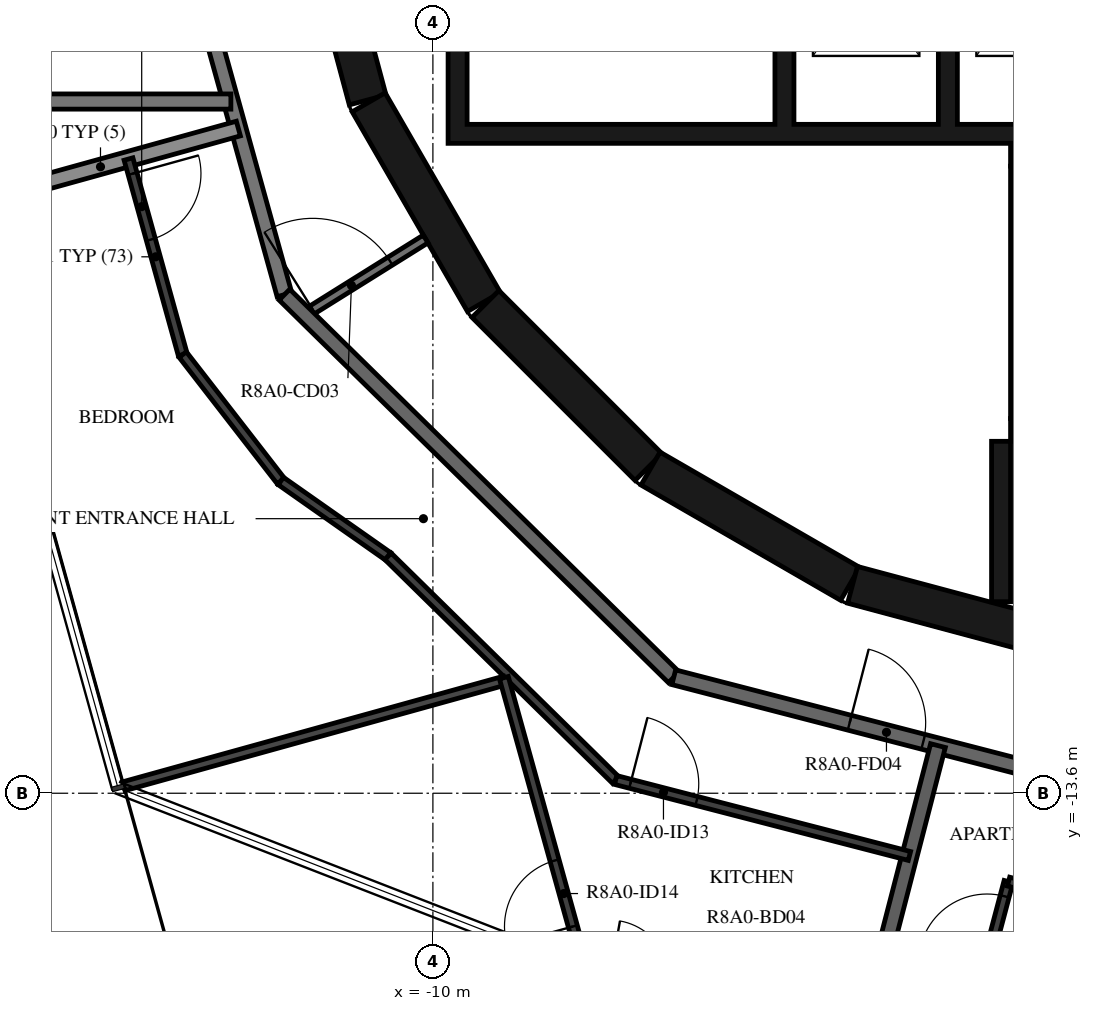
"""IFC4 building model, lengths in metres.
Left out: names, types, materials, properties, quantities, classifications, styles, units other than length and angle.
Written with IfcOpenShell. Run it as: python <this file> out.ifc"""

import sys

from ifc_helpers import new_model, si_unit, direction, frame, frame_2d, origin, place, context, subcontext, project, spatial, polyline, rectangle, outline, extrude, element, fill, save


model = new_model("IFC4")
c1 = context("Model", 3, precision=1e-05, world=origin(), true_north=direction((0.0, 1.0)))
c2 = subcontext(c1, "Body", "Model", "MODEL_VIEW")
j1 = project(units=[si_unit("LENGTHUNIT", "METRE"), si_unit("PLANEANGLEUNIT", "RADIAN")], contexts=[c1])
p1 = place(None, origin())
s1 = spatial("IfcSite", under=j1, at=p1, CompositionType="ELEMENT")
p2 = place(p1, origin())
s2 = spatial("IfcBuilding", under=s1, at=p2, CompositionType="ELEMENT")
p3 = place(p2, frame((0.0, 0.0, 305.2)))
s3 = spatial("IfcBuildingStorey", under=s2, at=p3, CompositionType="ELEMENT", Elevation=305.2)
p4 = place(p3, frame((-11.643, -1.55, 0.0), z_axis=(0.0, 0.0, 1.0), x_axis=(0.258734743916, -0.965948410781, 0.0)))
e1 = element("IfcWall", 1, at=p4, inside=s3, PredefinedType="SHEAR", context=c2, shape_type="SweptSolid", body=[
    extrude(rectangle(XDim=3.033, YDim=0.5, at=frame_2d((1.516, 0.0))), origin(), (0.0, 0.0, 1.0), 3.12),
])
p5 = place(p4, frame((1.066, 0.0, 0.0)))
e2 = element("IfcOpeningElement", 2, at=p5, cuts=e1, PredefinedType="OPENING", context=c2, shape_type="SweptSolid", body=[
    extrude(rectangle(XDim=0.9, YDim=2.1, at=frame_2d((0.45, 1.05))), frame((0.0, 0.26, 0.0), z_axis=(0.0, -1.0, 0.0), x_axis=(1.0, 0.0, 0.0)), (0.0, 0.0, 1.0), 0.52),
])
p6 = place(p3, frame((-10.845, -4.51, 0.0), z_axis=(0.0, 0.0, 1.0), x_axis=(0.500087131594, -0.865975092491, 0.0)))
e3 = element("IfcWall", 3, at=p6, inside=s3, PredefinedType="SHEAR", context=c2, shape_type="SweptSolid", body=[
    extrude(rectangle(XDim=3.033, YDim=0.5, at=frame_2d((1.516, 0.0))), origin(), (0.0, 0.0, 1.0), 3.12),
])
p7 = place(p3, frame((-9.308, -7.164, 0.0), z_axis=(0.0, 0.0, 1.0), x_axis=(0.707106781187, -0.707106781187, 0.0)))
e4 = element("IfcWall", 4, at=p7, inside=s3, PredefinedType="SHEAR", context=c2, shape_type="SweptSolid", body=[
    extrude(rectangle(XDim=3.032, YDim=0.5, at=frame_2d((1.516, 0.0))), origin(), (0.0, 0.0, 1.0), 3.12),
])
for number, where, z_axis, x_axis in (
    (5, (-7.137, -9.329, 0.0), (0.0, 0.0, 1.0), (0.866, -0.5, 0.0)),
    (6, (-4.479, -10.858, 0.0), (0.0, 0.0, 1.0), (0.966, -0.259, 0.0)),
):
    element("IfcWall", number, at=place(p3, frame(where, z_axis=z_axis, x_axis=x_axis)), inside=s3, PredefinedType="SHEAR", context=c2, shape_type="SweptSolid", body=[
        extrude(rectangle(XDim=3.033, YDim=0.5, at=frame_2d((1.516, 0.0))), origin(), (0.0, 0.0, 1.0), 3.12),
    ])
p8 = place(p3, frame((-2.275, -8.67, 0.0), z_axis=(0.0, 0.0, 1.0), x_axis=(0.0, 1.0, 0.0)))
e7 = element("IfcWall", 7, at=p8, inside=s3, PredefinedType="SHEAR", context=c2, shape_type="SweptSolid", body=[
    extrude(rectangle(XDim=3.32, YDim=0.25, at=frame_2d((1.66, 0.0))), origin(), (0.0, 0.0, 1.0), 3.12),
])
p9 = place(p3, frame((-2.4, -5.2, 0.0), z_axis=(0.0, 0.0, 1.0), x_axis=(1.0, 0.0, 0.0)))
e8 = element("IfcWall", 8, at=p9, inside=s3, PredefinedType="SHEAR", context=c2, shape_type="SweptSolid", body=[
    extrude(rectangle(XDim=7.05, YDim=0.3, at=frame_2d((3.525, 0.0))), origin(), (0.0, 0.0, 1.0), 3.12),
])
p10 = place(p3, frame((-2.4, -8.82, 0.0), z_axis=(0.0, 0.0, 1.0), x_axis=(1.0, 0.0, 0.0)))
e9 = element("IfcWall", 9, at=p10, inside=s3, PredefinedType="SHEAR", context=c2, shape_type="SweptSolid", body=[
    extrude(rectangle(XDim=2.5, YDim=0.3, at=frame_2d((1.25, 0.0))), origin(), (0.0, 0.0, 1.0), 3.12),
])
p11 = place(p10, frame((0.65, 0.0, 0.0)))
e10 = element("IfcOpeningElement", 10, at=p11, cuts=e9, PredefinedType="OPENING", context=c2, shape_type="SweptSolid", body=[
    extrude(rectangle(XDim=1.2, YDim=2.1, at=frame_2d((0.6, 1.05))), frame((0.0, 0.16, 0.0), z_axis=(0.0, -1.0, 0.0), x_axis=(1.0, 0.0, 0.0)), (0.0, 0.0, 1.0), 0.32),
])
p12 = place(p3, frame((-2.525, -8.97, 0.0), z_axis=(0.0, 0.0, 1.0), x_axis=(0.0, -1.0, 0.0)))
e11 = element("IfcWall", 11, at=p12, inside=s3, PredefinedType="SHEAR", context=c2, shape_type="SweptSolid", body=[
    extrude(rectangle(XDim=2.11, YDim=0.25, at=frame_2d((1.055, 0.0))), origin(), (0.0, 0.0, 1.0), 3.12),
])
p13 = place(p3, origin())
e12 = element("IfcWall", 12, at=p13, inside=s3, PredefinedType="SHEAR", context=c2, shape_type="SweptSolid", body=[
    extrude(outline(polyline([(9.8, -5.05), (9.8, -4.8), (9.8, -1.9), (9.55, -1.9), (9.55, -4.8), (7.65, -4.8), (7.65, -1.9), (7.4, -1.9), (7.4, -4.8), (5.5, -4.8), (5.5, -1.9), (5.25, -1.9), (5.25, -4.8), (3.35, -4.8), (3.35, -1.9), (3.1, -1.9), (3.1, -4.8), (1.2, -4.8), (1.2, -1.9), (0.95, -1.9), (0.95, -4.8), (-0.95, -4.8), (-0.95, -1.9), (-1.2, -1.9), (-1.2, -4.8), (-3.1, -4.8), (-3.1, -1.9), (-3.35, -1.9), (-3.35, -4.8), (-5.25, -4.8), (-5.25, -1.9), (-5.5, -1.9), (-5.5, -4.8), (-9.55, -4.8), (-9.55, -1.9), (-9.8, -1.9), (-9.8, -4.8), (-9.8, -5.05), (9.8, -5.05)])), origin(), (0.0, 0.0, 1.0), 3.12),
])
p14 = place(p3, frame((-11.687, -7.303, 0.0), z_axis=(0.0, 0.0, 1.0), x_axis=(0.848064094072, 0.529893661357, 0.0)))
e13 = element("IfcWall", 13, at=p14, inside=s3, PredefinedType="PARTITIONING", context=c2, shape_type="SweptSolid", body=[
    extrude(rectangle(XDim=1.876, YDim=0.12, at=frame_2d((0.938, 0.0))), origin(), (0.0, 0.0, 1.0), 3.12),
])
p15 = place(p14, frame((0.125, 0.0, 0.0)))
e14 = element("IfcOpeningElement", 14, at=p15, cuts=e13, PredefinedType="OPENING", context=c2, shape_type="SweptSolid", body=[
    extrude(rectangle(XDim=1.2, YDim=2.1, at=frame_2d((0.6, 1.05))), frame((0.0, 0.07, 0.0), z_axis=(0.0, -1.0, 0.0), x_axis=(1.0, 0.0, 0.0)), (0.0, 0.0, 1.0), 0.14),
])
p16 = place(p3, frame((-13.872, -0.121, 0.0), z_axis=(0.0, 0.0, 1.0), x_axis=(0.267254575108, -0.963625960674, 0.0)))
e15 = element("IfcWall", 15, at=p16, inside=s3, PredefinedType="STANDARD", context=c2, shape_type="SweptSolid", body=[
    extrude(rectangle(XDim=7.181, YDim=0.2, at=frame_2d((3.591, 0.0))), origin(), (0.0, 0.0, 1.0), 3.12),
])
p17 = place(p3, frame((-11.953, -7.041, 0.0), z_axis=(0.0, 0.0, 1.0), x_axis=(0.713250549143, -0.70090916255, 0.0)))
e16 = element("IfcWall", 16, at=p17, inside=s3, PredefinedType="STANDARD", context=c2, shape_type="SweptSolid", body=[
    extrude(rectangle(XDim=7.181, YDim=0.2, at=frame_2d((3.59, 0.0))), origin(), (0.0, 0.0, 1.0), 3.12),
])
p18 = place(p3, frame((-6.831, -12.074, 0.0), z_axis=(0.0, 0.0, 1.0), x_axis=(0.968144780225, -0.250391063186, 0.0)))
e17 = element("IfcWall", 17, at=p18, inside=s3, PredefinedType="STANDARD", context=c2, shape_type="SweptSolid", body=[
    extrude(rectangle(XDim=7.181, YDim=0.2, at=frame_2d((3.591, 0.0))), origin(), (0.0, 0.0, 1.0), 3.12),
])
p19 = place(p18, frame((2.39, 0.0, 0.0)))
e18 = element("IfcOpeningElement", 18, at=p19, cuts=e17, PredefinedType="OPENING", context=c2, shape_type="SweptSolid", body=[
    extrude(rectangle(XDim=1.0, YDim=2.1, at=frame_2d((0.5, 1.05))), frame((0.0, 0.11, 0.0), z_axis=(0.0, -1.0, 0.0), x_axis=(1.0, 0.0, 0.0)), (0.0, 0.0, 1.0), 0.22),
])
p20 = place(p18, frame((5.69, 0.0, 0.0)))
e19 = element("IfcOpeningElement", 19, at=p20, cuts=e17, PredefinedType="OPENING", context=c2, shape_type="SweptSolid", body=[
    extrude(rectangle(XDim=1.0, YDim=2.1, at=frame_2d((0.5, 1.05))), frame((0.0, 0.11, 0.0), z_axis=(0.0, -1.0, 0.0), x_axis=(1.0, 0.0, 0.0)), (0.0, 0.0, 1.0), 0.22),
])
p21 = place(p3, frame((-16.564, -4.5, 0.0), z_axis=(0.0, 0.0, 1.0), x_axis=(1.0, 0.0, 0.0)))
e20 = element("IfcWall", 20, at=p21, inside=s3, PredefinedType="STANDARD", context=c2, shape_type="SweptSolid", body=[
    extrude(rectangle(XDim=3.907, YDim=0.2, at=frame_2d((1.953, 0.0))), origin(), (0.0, 0.0, 1.0), 3.12),
])
p22 = place(p3, frame((-16.187, -5.862, 0.0), z_axis=(0.0, 0.0, 1.0), x_axis=(0.963631166683, 0.267235803358, 0.0)))
e21 = element("IfcWall", 21, at=p22, inside=s3, PredefinedType="STANDARD", context=c2, shape_type="SweptSolid", body=[
    extrude(rectangle(XDim=3.765, YDim=0.2, at=frame_2d((1.882, 0.0))), origin(), (0.0, 0.0, 1.0), 2.73),
])
p23 = place(p3, frame((-4.214, -16.295, 0.0), z_axis=(0.0, 0.0, 1.0), x_axis=(0.250428810918, 0.968135016752, 0.0)))
e22 = element("IfcWall", 22, at=p23, inside=s3, PredefinedType="STANDARD", context=c2, shape_type="SweptSolid", body=[
    extrude(rectangle(XDim=3.432, YDim=0.2, at=frame_2d((1.716, 0.0))), origin(), (0.0, 0.0, 1.0), 3.12),
])
p24 = place(p3, frame((-14.005, -5.256, 0.0), z_axis=(0.0, 0.0, 1.0), x_axis=(0.267200500487, -0.963640956238, 0.0)))
e23 = element("IfcWall", 23, at=p24, inside=s3, PredefinedType="PARTITIONING", context=c2, shape_type="SweptSolid", body=[
    extrude(rectangle(XDim=2.67, YDim=0.12, at=frame_2d((1.335, 0.0))), origin(), (0.0, 0.0, 1.0), 3.12),
])
p25 = place(p24, frame((0.2, 0.0, 0.0)))
e24 = element("IfcOpeningElement", 24, at=p25, cuts=e23, PredefinedType="OPENING", context=c2, shape_type="SweptSolid", body=[
    extrude(rectangle(XDim=0.9, YDim=2.1, at=frame_2d((0.45, 1.05))), frame((0.0, 0.07, 0.0), z_axis=(0.0, -1.0, 0.0), x_axis=(1.0, 0.0, 0.0)), (0.0, 0.0, 1.0), 0.14),
])
p26 = place(p3, frame((-13.291, -7.829, 0.0), z_axis=(0.0, 0.0, 1.0), x_axis=(0.613017069232, -0.790069663277, 0.0)))
e25 = element("IfcWall", 25, at=p26, inside=s3, PredefinedType="PARTITIONING", context=c2, shape_type="SweptSolid", body=[
    extrude(rectangle(XDim=2.106, YDim=0.12, at=frame_2d((1.053, 0.0))), origin(), (0.0, 0.0, 1.0), 3.12),
])
p27 = place(p3, frame((-12.0, -9.493, 0.0), z_axis=(0.0, 0.0, 1.0), x_axis=(0.818312362022, -0.57477376259, 0.0)))
e26 = element("IfcWall", 26, at=p27, inside=s3, PredefinedType="PARTITIONING", context=c2, shape_type="SweptSolid", body=[
    extrude(rectangle(XDim=1.723, YDim=0.12, at=frame_2d((0.862, 0.0))), origin(), (0.0, 0.0, 1.0), 3.12),
])
p28 = place(p3, frame((-10.59, -10.483, 0.0), z_axis=(0.0, 0.0, 1.0), x_axis=(0.713244109461, -0.70091571556, 0.0)))
e27 = element("IfcWall", 27, at=p28, inside=s3, PredefinedType="PARTITIONING", context=c2, shape_type="SweptSolid", body=[
    extrude(rectangle(XDim=4.198, YDim=0.12, at=frame_2d((2.099, 0.0))), origin(), (0.0, 0.0, 1.0), 3.12),
])
p29 = place(p3, frame((-7.596, -13.426, 0.0), z_axis=(0.0, 0.0, 1.0), x_axis=(0.96815406745, -0.250355151095, 0.0)))
e28 = element("IfcWall", 28, at=p29, inside=s3, PredefinedType="PARTITIONING", context=c2, shape_type="SweptSolid", body=[
    extrude(rectangle(XDim=3.992, YDim=0.12, at=frame_2d((1.996, 0.0))), origin(), (0.0, 0.0, 1.0), 3.12),
])
p30 = place(p29, frame((0.2, 0.0, 0.0)))
e29 = element("IfcOpeningElement", 29, at=p30, cuts=e28, PredefinedType="OPENING", context=c2, shape_type="SweptSolid", body=[
    extrude(rectangle(XDim=0.9, YDim=2.1, at=frame_2d((0.45, 1.05))), frame((0.0, 0.07, 0.0), z_axis=(0.0, -1.0, 0.0), x_axis=(1.0, 0.0, 0.0)), (0.0, 0.0, 1.0), 0.14),
])
p31 = place(p3, frame((-14.066, -13.508, 0.0), z_axis=(0.0, 0.0, 1.0), x_axis=(0.963643585504, 0.267191018032, 0.0)))
e30 = element("IfcWall", 30, at=p31, inside=s3, PredefinedType="PARTITIONING", context=c2, shape_type="SweptSolid", body=[
    extrude(rectangle(XDim=5.2, YDim=0.12, at=frame_2d((2.6, 0.0))), origin(), (0.0, 0.0, 1.0), 2.73),
])
p32 = place(p3, frame((-7.368, -18.202, 0.0), z_axis=(0.0, 0.0, 1.0), x_axis=(-0.26723158658, 0.963632336077, 0.0)))
e31 = element("IfcWall", 31, at=p32, inside=s3, PredefinedType="PARTITIONING", context=c2, shape_type="SweptSolid", body=[
    extrude(rectangle(XDim=6.353, YDim=0.12, at=frame_2d((3.177, 0.0))), origin(), (0.0, 0.0, 1.0), 3.12),
])
p33 = place(p32, frame((2.956, 0.0, 0.0)))
e32 = element("IfcOpeningElement", 32, at=p33, cuts=e31, PredefinedType="OPENING", context=c2, shape_type="SweptSolid", body=[
    extrude(rectangle(XDim=0.9, YDim=2.1, at=frame_2d((0.45, 1.05))), frame((0.0, 0.07, 0.0), z_axis=(0.0, -1.0, 0.0), x_axis=(1.0, 0.0, 0.0)), (0.0, 0.0, 1.0), 0.14),
])
p34 = place(p3, frame((-3.139, -17.448, 0.0), z_axis=(0.0, 0.0, 1.0), x_axis=(0.256551998295, 0.966530430028, 0.0)))
e33 = element("IfcWall", 33, at=p34, inside=s3, PredefinedType="PARTITIONING", context=c2, shape_type="SweptSolid", body=[
    extrude(rectangle(XDim=2.778, YDim=0.12, at=frame_2d((1.389, 0.0))), origin(), (0.0, 0.0, 1.0), 3.12),
])
p35 = place(p34, frame((1.678, 0.0, 0.0)))
e34 = element("IfcOpeningElement", 34, at=p35, cuts=e33, PredefinedType="OPENING", context=c2, shape_type="SweptSolid", body=[
    extrude(rectangle(XDim=0.9, YDim=2.1, at=frame_2d((0.45, 1.05))), frame((0.0, 0.07, 0.0), z_axis=(0.0, -1.0, 0.0), x_axis=(1.0, 0.0, 0.0)), (0.0, 0.0, 1.0), 0.14),
])
p36 = place(p3, frame((-2.427, -14.763, 0.0), z_axis=(0.0, 0.0, 1.0), x_axis=(0.968151154118, -0.250366417036, 0.0)))
e35 = element("IfcWall", 35, at=p36, inside=s3, PredefinedType="PARTITIONING", context=c2, shape_type="SweptSolid", body=[
    extrude(rectangle(XDim=2.646, YDim=0.12, at=frame_2d((1.323, 0.0))), origin(), (0.0, 0.0, 1.0), 3.12),
])
p37 = place(p19, origin())
e36 = element("IfcDoor", 36, at=p37, inside=s3, OperationType="SINGLE_SWING_RIGHT", PredefinedType="DOOR", context=c2, shape_type="SweptSolid", body=[
    extrude(rectangle(XDim=1.0, YDim=2.1, at=frame_2d((0.5, 1.05))), frame((0.0, 0.025, 0.0), z_axis=(0.0, -1.0, 0.0), x_axis=(1.0, 0.0, 0.0)), (0.0, 0.0, 1.0), 0.05),
])
fill(e18, e36)
p38 = place(p25, origin())
e37 = element("IfcDoor", 37, at=p38, inside=s3, OperationType="SINGLE_SWING_RIGHT", PredefinedType="DOOR", context=c2, shape_type="SweptSolid", body=[
    extrude(rectangle(XDim=0.9, YDim=2.1, at=frame_2d((0.45, 1.05))), frame((0.0, 0.025, 0.0), z_axis=(0.0, -1.0, 0.0), x_axis=(1.0, 0.0, 0.0)), (0.0, 0.0, 1.0), 0.05),
])
fill(e24, e37)
p39 = place(p30, origin())
e38 = element("IfcDoor", 38, at=p39, inside=s3, OperationType="SINGLE_SWING_RIGHT", PredefinedType="DOOR", context=c2, shape_type="SweptSolid", body=[
    extrude(rectangle(XDim=0.9, YDim=2.1, at=frame_2d((0.45, 1.05))), frame((0.0, 0.025, 0.0), z_axis=(0.0, -1.0, 0.0), x_axis=(1.0, 0.0, 0.0)), (0.0, 0.0, 1.0), 0.05),
])
fill(e29, e38)
p40 = place(p33, origin())
e39 = element("IfcDoor", 39, at=p40, inside=s3, OperationType="SINGLE_SWING_RIGHT", PredefinedType="DOOR", context=c2, shape_type="SweptSolid", body=[
    extrude(rectangle(XDim=0.9, YDim=2.1, at=frame_2d((0.45, 1.05))), frame((0.0, 0.025, 0.0), z_axis=(0.0, -1.0, 0.0), x_axis=(1.0, 0.0, 0.0)), (0.0, 0.0, 1.0), 0.05),
])
fill(e32, e39)
p41 = place(p35, origin())
e40 = element("IfcDoor", 40, at=p41, inside=s3, OperationType="SINGLE_SWING_LEFT", PredefinedType="DOOR", context=c2, shape_type="SweptSolid", body=[
    extrude(rectangle(XDim=0.9, YDim=2.1, at=frame_2d((0.45, 1.05))), frame((0.0, 0.025, 0.0), z_axis=(0.0, -1.0, 0.0), x_axis=(1.0, 0.0, 0.0)), (0.0, 0.0, 1.0), 0.05),
])
fill(e34, e40)
p42 = place(p15, origin())
e41 = element("IfcDoor", 41, at=p42, inside=s3, OperationType="DOUBLE_DOOR_SINGLE_SWING", PredefinedType="DOOR", context=c2, shape_type="SweptSolid", body=[
    extrude(rectangle(XDim=1.2, YDim=2.1, at=frame_2d((0.6, 1.05))), frame((0.0, 0.025, 0.0), z_axis=(0.0, -1.0, 0.0), x_axis=(1.0, 0.0, 0.0)), (0.0, 0.0, 1.0), 0.05),
])
fill(e14, e41)
save(model, sys.argv[1])
